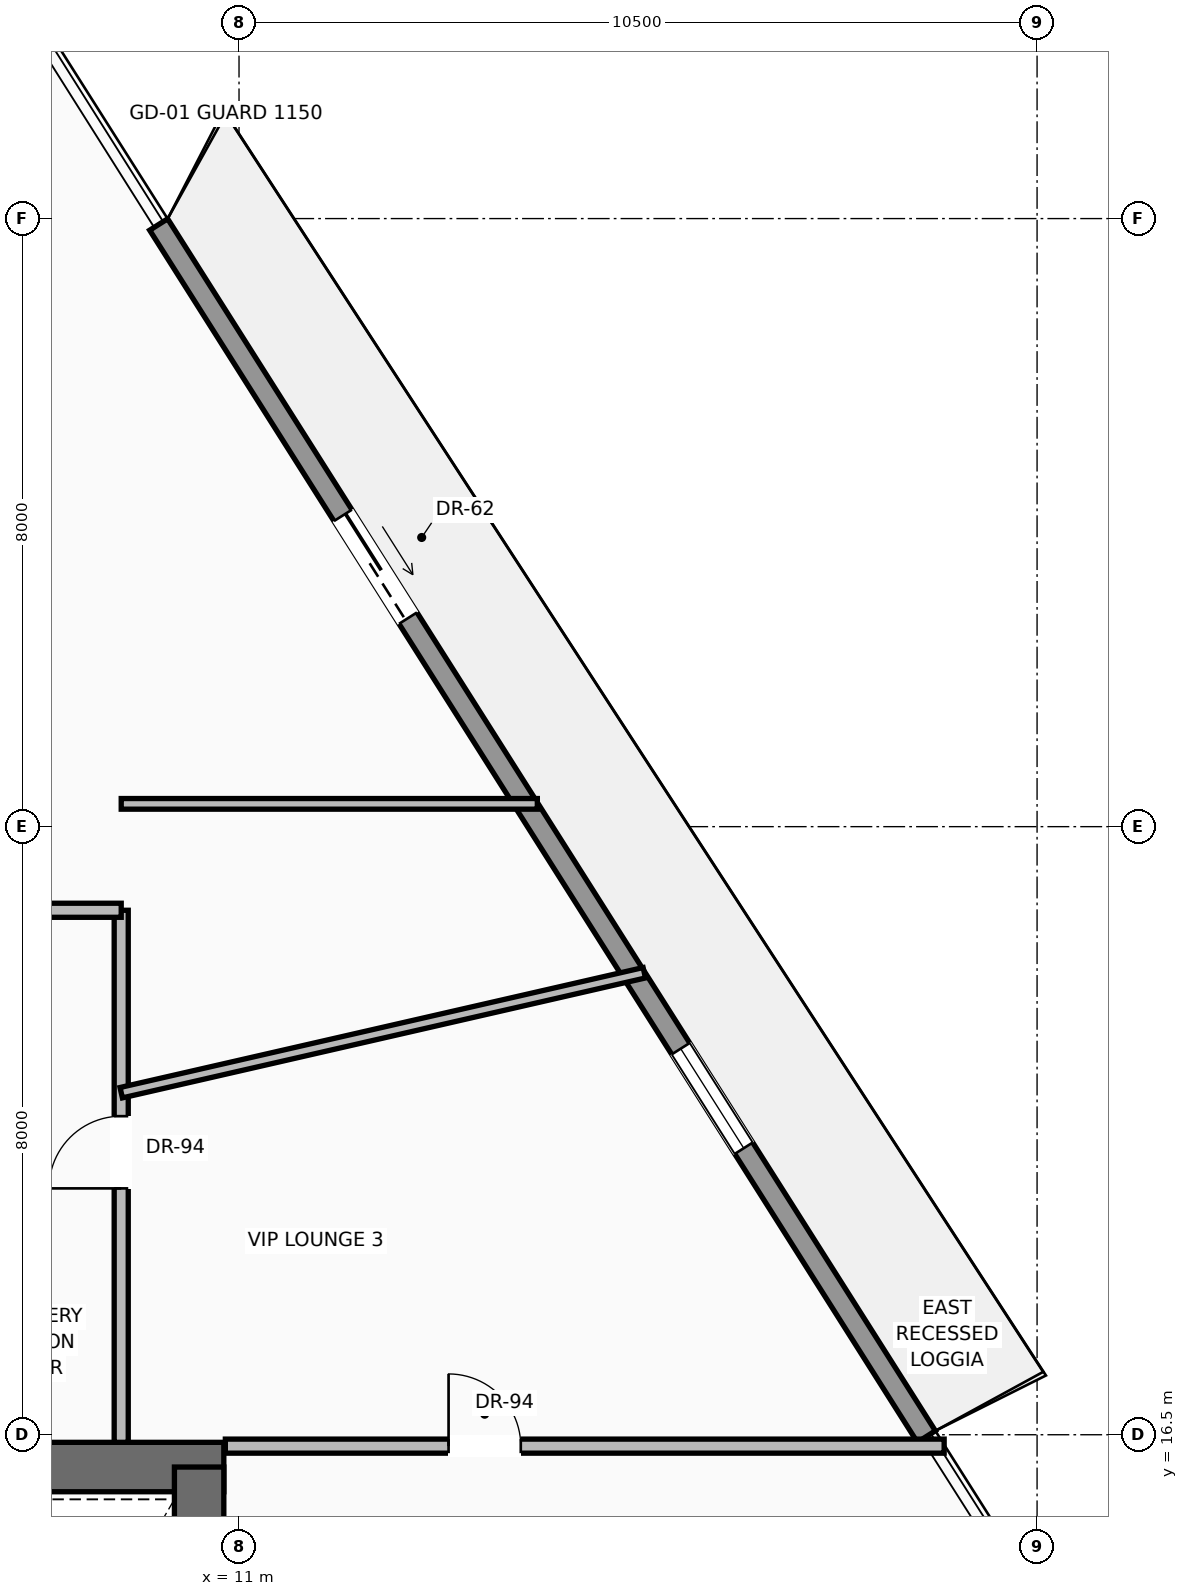
"""IFC4 building model, lengths in metres.
Left out: names, types, materials, properties, quantities, classifications, styles, units other than length and angle.
Written with IfcOpenShell. Run it as: python <this file> out.ifc"""

import sys

from ifc_helpers import new_model, si_unit, direction, frame, frame_2d, origin, place, context, subcontext, project, spatial, rectangle, extrude, source, transform, mapped, element, fill, save


model = new_model("IFC4")
c1 = context("Model", 3, precision=1e-05, world=origin(), true_north=direction((0.0, 1.0)))
c2 = subcontext(c1, "Body", "Model", "MODEL_VIEW")
j1 = project(units=[si_unit("LENGTHUNIT", "METRE"), si_unit("PLANEANGLEUNIT", "RADIAN")], contexts=[c1])
p1 = place(None, origin())
s1 = spatial("IfcSite", under=j1, at=p1, CompositionType="ELEMENT")
p2 = place(p1, origin())
s2 = spatial("IfcBuilding", under=s1, at=p2, CompositionType="ELEMENT")
p3 = place(p2, frame((0.0, 0.0, 185.8)))
s3 = spatial("IfcBuildingStorey", under=s2, at=p3, CompositionType="ELEMENT", Elevation=185.8)
p4 = place(p3, frame((-10.8, 16.075, 0.0), z_axis=(0.0, 0.0, 1.0), x_axis=(1.0, 0.0, 0.0)))
e1 = element("IfcWall", 1, at=p4, inside=s3, PredefinedType="SHEAR", context=c2, shape_type="SweptSolid", body=[
    extrude(rectangle(XDim=21.6, YDim=0.65, at=frame_2d((10.8, 0.0))), origin(), (0.0, 0.0, 1.0), 3.47),
])
p5 = place(p4, frame((3.37, 0.0, 0.0)))
e2 = element("IfcOpeningElement", 2, at=p5, cuts=e1, PredefinedType="OPENING", context=c2, shape_type="SweptSolid", body=[
    extrude(rectangle(XDim=1.3, YDim=2.3, at=frame_2d((0.65, 1.15))), frame((0.0, 0.335, 0.0), z_axis=(0.0, -1.0, 0.0), x_axis=(1.0, 0.0, 0.0)), (0.0, 0.0, 1.0), 0.67),
])
p6 = place(p4, frame((9.8, 0.0, 0.0)))
e3 = element("IfcOpeningElement", 3, at=p6, cuts=e1, PredefinedType="OPENING", context=c2, shape_type="SweptSolid", body=[
    extrude(rectangle(XDim=2.0, YDim=2.4, at=frame_2d((1.0, 1.2))), frame((0.0, 0.335, 0.0), z_axis=(0.0, -1.0, 0.0), x_axis=(1.0, 0.0, 0.0)), (0.0, 0.0, 1.0), 0.67),
])
p7 = place(p3, frame((10.475, 0.525, 0.0), z_axis=(0.0, 0.0, 1.0), x_axis=(0.0, 1.0, 0.0)))
e4 = element("IfcWall", 4, at=p7, inside=s3, PredefinedType="SHEAR", context=c2, shape_type="SweptSolid", body=[
    extrude(rectangle(XDim=15.55, YDim=0.65, at=frame_2d((7.775, 0.0))), origin(), (0.0, 0.0, 1.0), 3.47),
])
p8 = place(p3, frame((9.943, 32.422, 0.0), z_axis=(0.0, 0.0, 1.0), x_axis=(0.535123469973, -0.844773858428, 0.0)))
e5 = element("IfcWall", 5, at=p8, inside=s3, PredefinedType="SOLIDWALL", context=c2, shape_type="SweptSolid", body=[
    extrude(rectangle(XDim=18.875, YDim=0.28, at=frame_2d((9.438, 0.0))), origin(), (0.0, 0.0, 1.0), 3.05),
])
p9 = place(p8, frame((4.53, 0.0, 0.0)))
e6 = element("IfcOpeningElement", 6, at=p9, cuts=e5, PredefinedType="OPENING", context=c2, shape_type="SweptSolid", body=[
    extrude(rectangle(XDim=1.6, YDim=2.35, at=frame_2d((0.8, 1.175))), frame((0.0, 0.15, 0.0), z_axis=(0.0, -1.0, 0.0), x_axis=(1.0, 0.0, 0.0)), (0.0, 0.0, 1.0), 0.3),
])
p10 = place(p8, frame((12.835, 0.0, 0.9)))
e7 = element("IfcOpeningElement", 7, at=p10, cuts=e5, PredefinedType="OPENING", context=c2, shape_type="SweptSolid", body=[
    extrude(rectangle(XDim=1.55, YDim=1.85, at=frame_2d((0.775, 0.925))), frame((0.0, 0.15, 0.0), z_axis=(0.0, -1.0, 0.0), x_axis=(1.0, 0.0, 0.0)), (0.0, 0.0, 1.0), 0.3),
])
p11 = place(p3, frame((9.45, 16.4, 0.0), z_axis=(0.0, 0.0, 1.0), x_axis=(0.0, 1.0, 0.0)))
e8 = element("IfcWall", 8, at=p11, inside=s3, PredefinedType="PARTITIONING", context=c2, shape_type="SweptSolid", body=[
    extrude(rectangle(XDim=7.0, YDim=0.185, at=frame_2d((3.5, 0.0))), origin(), (0.0, 0.0, 1.0), 3.462),
])
p12 = place(p11, frame((3.341, 0.0, 0.0)))
e9 = element("IfcOpeningElement", 9, at=p12, cuts=e8, PredefinedType="OPENING", context=c2, shape_type="SweptSolid", body=[
    extrude(rectangle(XDim=0.95, YDim=2.2, at=frame_2d((0.475, 1.1))), frame((0.0, 0.103, 0.0), z_axis=(0.0, -1.0, 0.0), x_axis=(1.0, 0.0, 0.0)), (0.0, 0.0, 1.0), 0.205),
])
p13 = place(p3, frame((7.25, 23.4, 0.0), z_axis=(0.0, 0.0, 1.0), x_axis=(1.0, 0.0, 0.0)))
e10 = element("IfcWall", 10, at=p13, inside=s3, PredefinedType="PARTITIONING", context=c2, shape_type="SweptSolid", body=[
    extrude(rectangle(XDim=2.2, YDim=0.185, at=frame_2d((1.1, 0.0))), origin(), (0.0, 0.0, 1.0), 3.462),
])
p14 = place(p3, frame((10.82, 16.35, 0.0), z_axis=(0.0, 0.0, 1.0), x_axis=(1.0, 0.0, 0.0)))
e11 = element("IfcWall", 11, at=p14, inside=s3, PredefinedType="PARTITIONING", context=c2, shape_type="SweptSolid", body=[
    extrude(rectangle(XDim=9.458, YDim=0.185, at=frame_2d((4.729, 0.0))), origin(), (0.0, 0.0, 1.0), 3.462),
])
p15 = place(p14, frame((2.937, 0.0, 0.0)))
e12 = element("IfcOpeningElement", 12, at=p15, cuts=e11, PredefinedType="OPENING", context=c2, shape_type="SweptSolid", body=[
    extrude(rectangle(XDim=0.95, YDim=2.2, at=frame_2d((0.475, 1.1))), frame((0.0, 0.103, 0.0), z_axis=(0.0, -1.0, 0.0), x_axis=(1.0, 0.0, 0.0)), (0.0, 0.0, 1.0), 0.205),
])
p16 = place(p3, frame((9.45, 21.0, 0.0), z_axis=(0.0, 0.0, 1.0), x_axis=(0.974713024, 0.22346033394, 0.0)))
e13 = element("IfcWall", 13, at=p16, inside=s3, PredefinedType="PARTITIONING", context=c2, shape_type="SweptSolid", body=[
    extrude(rectangle(XDim=7.061, YDim=0.14, at=frame_2d((3.531, 0.0))), origin(), (0.0, 0.0, 1.0), 3.049),
])
p17 = place(p3, frame((9.45, 24.8, 0.0), z_axis=(0.0, 0.0, 1.0), x_axis=(1.0, 0.0, 0.0)))
e14 = element("IfcWall", 14, at=p17, inside=s3, PredefinedType="PARTITIONING", context=c2, shape_type="SweptSolid", body=[
    extrude(rectangle(XDim=5.475, YDim=0.14, at=frame_2d((2.737, 0.0))), origin(), (0.0, 0.0, 1.0), 3.462),
])
m1 = source(origin(), c2, "Body", "SweptSolid", [
    extrude(rectangle(XDim=1.6, YDim=2.35, at=frame_2d((0.8, 1.175))), frame((0.0, 0.025, 0.0), z_axis=(0.0, -1.0, 0.0), x_axis=(1.0, 0.0, 0.0)), (0.0, 0.0, 1.0), 0.05),
])
p18 = place(p9, origin())
e15 = element("IfcDoor", 15, at=p18, inside=s3, OperationType="SLIDING_TO_RIGHT", PredefinedType="DOOR", context=c2, shape_type="MappedRepresentation", body=[
    mapped(m1, transform((0.0, 0.0, 0.0), scale=1.0)),
])
fill(e6, e15)
m2 = source(origin(), c2, "Body", "SweptSolid", [
    extrude(rectangle(XDim=1.55, YDim=1.85, at=frame_2d((0.775, 0.925))), frame((0.0, 0.03, 0.0), z_axis=(0.0, -1.0, 0.0), x_axis=(1.0, 0.0, 0.0)), (0.0, 0.0, 1.0), 0.06),
])
p19 = place(p10, origin())
e16 = element("IfcWindow", 16, at=p19, inside=s3, PartitioningType="SINGLE_PANEL", PredefinedType="WINDOW", context=c2, shape_type="MappedRepresentation", body=[
    mapped(m2, transform((0.0, 0.0, 0.0), scale=1.0)),
])
fill(e7, e16)
m3 = source(origin(), c2, "Body", "SweptSolid", [
    extrude(rectangle(XDim=0.95, YDim=2.2, at=frame_2d((0.475, 1.1))), frame((0.0, 0.025, 0.0), z_axis=(0.0, -1.0, 0.0), x_axis=(1.0, 0.0, 0.0)), (0.0, 0.0, 1.0), 0.05),
])
p20 = place(p12, origin())
e17 = element("IfcDoor", 17, at=p20, inside=s3, OperationType="SINGLE_SWING_LEFT", PredefinedType="DOOR", context=c2, shape_type="MappedRepresentation", body=[
    mapped(m3, transform((0.0, 0.0, 0.0), scale=1.0)),
])
fill(e9, e17)
p21 = place(p15, origin())
e18 = element("IfcDoor", 18, at=p21, inside=s3, OperationType="SINGLE_SWING_LEFT", PredefinedType="DOOR", context=c2, shape_type="MappedRepresentation", body=[
    mapped(m3, transform((0.0, 0.0, 0.0), scale=1.0)),
])
fill(e12, e18)
save(model, sys.argv[1])
